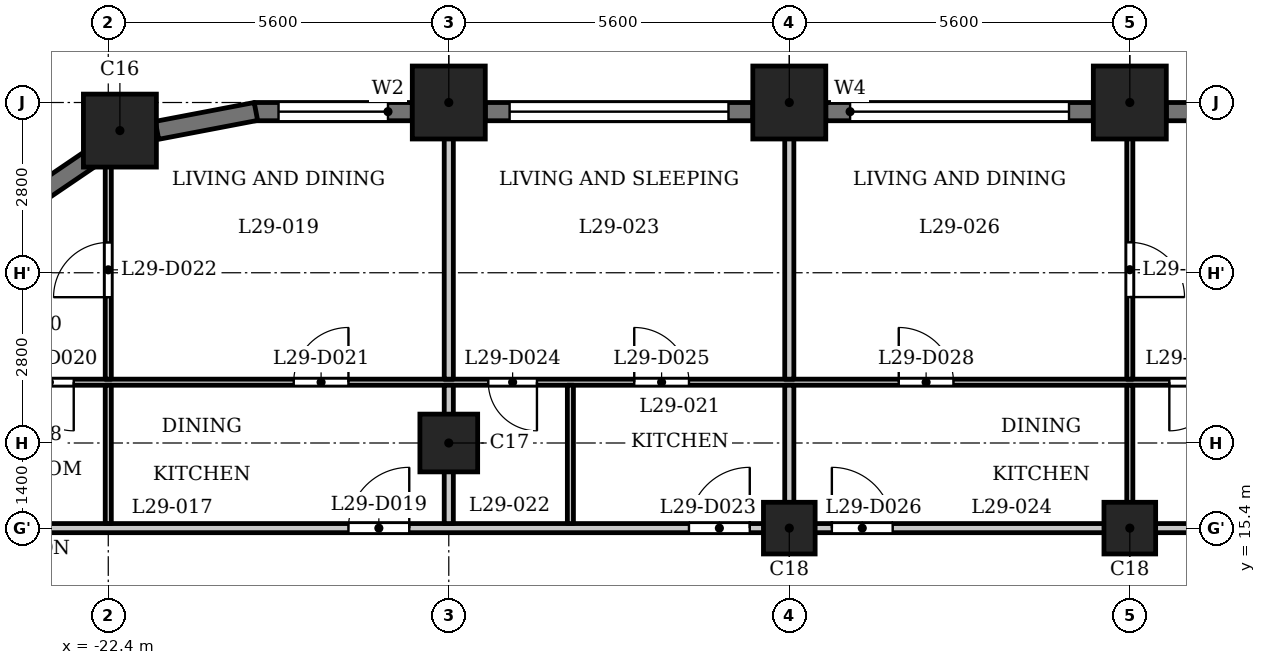
"""IFC4 building model, lengths in metres.
Left out: names, types, materials, properties, quantities, classifications, styles, units other than length and angle.
Written with IfcOpenShell. Run it as: python <this file> out.ifc"""

import sys

from ifc_helpers import new_model, si_unit, direction, frame, frame_2d, origin, origin_2d, place, context, subcontext, project, spatial, rectangle, extrude, element, fill, save


model = new_model("IFC4")
c1 = context("Model", 3, precision=1e-05, world=origin(), true_north=direction((0.0, 1.0)))
c2 = subcontext(c1, "Body", "Model", "MODEL_VIEW")
j1 = project(units=[si_unit("LENGTHUNIT", "METRE"), si_unit("PLANEANGLEUNIT", "RADIAN")], contexts=[c1])
p1 = place(None, origin())
s1 = spatial("IfcSite", under=j1, at=p1, CompositionType="ELEMENT")
p2 = place(p1, origin())
s2 = spatial("IfcBuilding", under=s1, at=p2, CompositionType="ELEMENT")
p3 = place(p2, frame((0.0, 0.0, 114.8)))
s3 = spatial("IfcBuildingStorey", under=s2, at=p3, CompositionType="ELEMENT", Elevation=114.8)
for number, where, z_axis, x_axis in (
    (1, (-5.6, 22.4, 0.0), (0.0, 0.0, 1.0), (1.0, 0.0, 0.0)),
    (2, (-11.2, 22.4, 0.0), (0.0, 0.0, 1.0), (1.0, 0.0, 0.0)),
    (3, (-16.8, 22.4, 0.0), (0.0, 0.0, 1.0), (1.0, 0.0, 0.0)),
    (4, (-22.209, 21.938, 0.0), (0.0, 0.0, 1.0), (1.0, 0.0, 0.0)),
):
    element("IfcColumn", number, at=place(p3, frame(where, z_axis=z_axis, x_axis=x_axis)), inside=s3, PredefinedType="COLUMN", context=c2, shape_type="SweptSolid", body=[
        extrude(rectangle(XDim=1.2, YDim=1.2, at=origin_2d()), origin(), (0.0, 0.0, 1.0), 3.5),
    ])
p4 = place(p3, frame((-16.8, 16.8, 0.0), z_axis=(0.0, 0.0, 1.0), x_axis=(1.0, 0.0, 0.0)))
e5 = element("IfcColumn", 5, at=p4, inside=s3, PredefinedType="COLUMN", context=c2, shape_type="SweptSolid", body=[
    extrude(rectangle(XDim=0.95, YDim=0.95, at=origin_2d()), origin(), (0.0, 0.0, 1.0), 3.5),
])
for number, where, z_axis, x_axis in (
    (6, (-11.2, 15.4, 0.0), (0.0, 0.0, 1.0), (1.0, 0.0, 0.0)),
    (7, (-5.6, 15.4, 0.0), (0.0, 0.0, 1.0), (1.0, 0.0, 0.0)),
):
    element("IfcColumn", number, at=place(p3, frame(where, z_axis=z_axis, x_axis=x_axis)), inside=s3, PredefinedType="COLUMN", context=c2, shape_type="SweptSolid", body=[
        extrude(rectangle(XDim=0.85, YDim=0.85, at=origin_2d()), origin(), (0.0, 0.0, 1.0), 3.5),
    ])
p5 = place(p3, frame((-0.6, 22.25, 0.0), z_axis=(0.0, 0.0, 1.0), x_axis=(-1.0, 0.0, 0.0)))
e8 = element("IfcWall", 8, at=p5, inside=s3, PredefinedType="SOLIDWALL", context=c2, shape_type="SweptSolid", body=[
    extrude(rectangle(XDim=4.4, YDim=0.3, at=frame_2d((2.2, 0.0))), origin(), (0.0, 0.0, 1.0), 2.4),
])
p6 = place(p5, frame((0.4, 0.0, 1.2)))
e9 = element("IfcOpeningElement", 9, at=p6, cuts=e8, PredefinedType="OPENING", context=c2, shape_type="SweptSolid", body=[
    extrude(rectangle(XDim=3.6, YDim=0.95, at=frame_2d((1.8, 0.475))), frame((0.0, 0.16, 0.0), z_axis=(0.0, -1.0, 0.0), x_axis=(1.0, 0.0, 0.0)), (0.0, 0.0, 1.0), 0.32),
])
p7 = place(p3, frame((-6.2, 22.25, 0.0), z_axis=(0.0, 0.0, 1.0), x_axis=(-1.0, 0.0, 0.0)))
e10 = element("IfcWall", 10, at=p7, inside=s3, PredefinedType="SOLIDWALL", context=c2, shape_type="SweptSolid", body=[
    extrude(rectangle(XDim=4.4, YDim=0.3, at=frame_2d((2.2, 0.0))), origin(), (0.0, 0.0, 1.0), 2.4),
])
p8 = place(p7, frame((0.4, 0.0, 1.2)))
e11 = element("IfcOpeningElement", 11, at=p8, cuts=e10, PredefinedType="OPENING", context=c2, shape_type="SweptSolid", body=[
    extrude(rectangle(XDim=3.6, YDim=0.95, at=frame_2d((1.8, 0.475))), frame((0.0, 0.16, 0.0), z_axis=(0.0, -1.0, 0.0), x_axis=(1.0, 0.0, 0.0)), (0.0, 0.0, 1.0), 0.32),
])
p9 = place(p3, frame((-11.8, 22.25, 0.0), z_axis=(0.0, 0.0, 1.0), x_axis=(-1.0, 0.0, 0.0)))
e12 = element("IfcWall", 12, at=p9, inside=s3, PredefinedType="SOLIDWALL", context=c2, shape_type="SweptSolid", body=[
    extrude(rectangle(XDim=4.4, YDim=0.3, at=frame_2d((2.2, 0.0))), origin(), (0.0, 0.0, 1.0), 2.4),
])
p10 = place(p9, frame((0.4, 0.0, 1.2)))
e13 = element("IfcOpeningElement", 13, at=p10, cuts=e12, PredefinedType="OPENING", context=c2, shape_type="SweptSolid", body=[
    extrude(rectangle(XDim=3.6, YDim=0.95, at=frame_2d((1.8, 0.475))), frame((0.0, 0.16, 0.0), z_axis=(0.0, -1.0, 0.0), x_axis=(1.0, 0.0, 0.0)), (0.0, 0.0, 1.0), 0.32),
])
p11 = place(p3, frame((-17.4, 22.25, 0.0), z_axis=(0.0, 0.0, 1.0), x_axis=(-1.0, 0.0, 0.0)))
e14 = element("IfcWall", 14, at=p11, inside=s3, PredefinedType="SOLIDWALL", context=c2, shape_type="SweptSolid", body=[
    extrude(rectangle(XDim=2.6, YDim=0.3, at=frame_2d((1.3, 0.0))), origin(), (0.0, 0.0, 1.0), 2.4),
])
p12 = place(p11, frame((0.4, 0.0, 0.9)))
e15 = element("IfcOpeningElement", 15, at=p12, cuts=e14, PredefinedType="OPENING", context=c2, shape_type="SweptSolid", body=[
    extrude(rectangle(XDim=1.8, YDim=1.25, at=frame_2d((0.9, 0.625))), frame((0.0, 0.16, 0.0), z_axis=(0.0, -1.0, 0.0), x_axis=(1.0, 0.0, 0.0)), (0.0, 0.0, 1.0), 0.32),
])
for number, where, z_axis, x_axis in (
    (16, (-19.972, 22.253, 0.0), (0.0, 0.0, 1.0), (-0.982, -0.187, 0.0)),
    (17, (-22.643, 21.51, 0.0), (0.0, 0.0, 1.0), (-0.827, -0.562, 0.0)),
):
    element("IfcWall", number, at=place(p3, frame(where, z_axis=z_axis, x_axis=x_axis)), inside=s3, PredefinedType="SOLIDWALL", context=c2, shape_type="SweptSolid", body=[
        extrude(rectangle(XDim=1.656, YDim=0.3, at=frame_2d((0.828, 0.0))), origin(), (0.0, 0.0, 1.0), 2.4),
    ])
p13 = place(p3, frame((-27.484, 15.4, 0.0), z_axis=(0.0, 0.0, 1.0), x_axis=(1.0, 0.0, 0.0)))
e18 = element("IfcWall", 18, at=p13, inside=s3, PredefinedType="PARTITIONING", context=c2, shape_type="SweptSolid", body=[
    extrude(rectangle(XDim=54.968, YDim=0.15, at=frame_2d((27.484, 0.0))), origin(), (0.0, 0.0, 1.0), 3.2),
])
p14 = place(p13, frame((9.034, 0.0, 0.0)))
e19 = element("IfcOpeningElement", 19, at=p14, cuts=e18, PredefinedType="OPENING", context=c2, shape_type="SweptSolid", body=[
    extrude(rectangle(XDim=1.0, YDim=2.1, at=frame_2d((0.5, 1.05))), frame((0.0, 0.085, 0.0), z_axis=(0.0, -1.0, 0.0), x_axis=(1.0, 0.0, 0.0)), (0.0, 0.0, 1.0), 0.17),
])
p15 = place(p13, frame((14.634, 0.0, 0.0)))
e20 = element("IfcOpeningElement", 20, at=p15, cuts=e18, PredefinedType="OPENING", context=c2, shape_type="SweptSolid", body=[
    extrude(rectangle(XDim=1.0, YDim=2.1, at=frame_2d((0.5, 1.05))), frame((0.0, 0.085, 0.0), z_axis=(0.0, -1.0, 0.0), x_axis=(1.0, 0.0, 0.0)), (0.0, 0.0, 1.0), 0.17),
])
p16 = place(p13, frame((16.984, 0.0, 0.0)))
e21 = element("IfcOpeningElement", 21, at=p16, cuts=e18, PredefinedType="OPENING", context=c2, shape_type="SweptSolid", body=[
    extrude(rectangle(XDim=1.0, YDim=2.1, at=frame_2d((0.5, 1.05))), frame((0.0, 0.085, 0.0), z_axis=(0.0, -1.0, 0.0), x_axis=(1.0, 0.0, 0.0)), (0.0, 0.0, 1.0), 0.17),
])
p17 = place(p13, frame((28.084, 0.0, 0.0)))
e22 = element("IfcOpeningElement", 22, at=p17, cuts=e18, PredefinedType="OPENING", context=c2, shape_type="SweptSolid", body=[
    extrude(rectangle(XDim=1.0, YDim=2.1, at=frame_2d((0.5, 1.05))), frame((0.0, 0.085, 0.0), z_axis=(0.0, -1.0, 0.0), x_axis=(1.0, 0.0, 0.0)), (0.0, 0.0, 1.0), 0.17),
])
p18 = place(p13, frame((34.834, 0.0, 0.0)))
e23 = element("IfcOpeningElement", 23, at=p18, cuts=e18, PredefinedType="OPENING", context=c2, shape_type="SweptSolid", body=[
    extrude(rectangle(XDim=1.0, YDim=2.1, at=frame_2d((0.5, 1.05))), frame((0.0, 0.085, 0.0), z_axis=(0.0, -1.0, 0.0), x_axis=(1.0, 0.0, 0.0)), (0.0, 0.0, 1.0), 0.17),
])
p19 = place(p13, frame((41.884, 0.0, 0.0)))
e24 = element("IfcOpeningElement", 24, at=p19, cuts=e18, PredefinedType="OPENING", context=c2, shape_type="SweptSolid", body=[
    extrude(rectangle(XDim=1.0, YDim=2.1, at=frame_2d((0.5, 1.05))), frame((0.0, 0.085, 0.0), z_axis=(0.0, -1.0, 0.0), x_axis=(1.0, 0.0, 0.0)), (0.0, 0.0, 1.0), 0.17),
])
p20 = place(p13, frame((48.234, 0.0, 0.0)))
e25 = element("IfcOpeningElement", 25, at=p20, cuts=e18, PredefinedType="OPENING", context=c2, shape_type="SweptSolid", body=[
    extrude(rectangle(XDim=1.0, YDim=2.1, at=frame_2d((0.5, 1.05))), frame((0.0, 0.085, 0.0), z_axis=(0.0, -1.0, 0.0), x_axis=(1.0, 0.0, 0.0)), (0.0, 0.0, 1.0), 0.17),
])
p21 = place(p3, frame((-26.465, 17.8, 0.0), z_axis=(0.0, 0.0, 1.0), x_axis=(1.0, 0.0, 0.0)))
e26 = element("IfcWall", 26, at=p21, inside=s3, PredefinedType="PARTITIONING", context=c2, shape_type="SweptSolid", body=[
    extrude(rectangle(XDim=52.859, YDim=0.1, at=frame_2d((26.43, 0.0))), origin(), (0.0, 0.0, 1.0), 3.2),
])
p22 = place(p21, frame((2.697, 0.0, 0.0)))
e27 = element("IfcOpeningElement", 27, at=p22, cuts=e26, PredefinedType="OPENING", context=c2, shape_type="SweptSolid", body=[
    extrude(rectangle(XDim=0.8, YDim=2.1, at=frame_2d((0.4, 1.05))), frame((0.0, 0.06, 0.0), z_axis=(0.0, -1.0, 0.0), x_axis=(1.0, 0.0, 0.0)), (0.0, 0.0, 1.0), 0.12),
])
p23 = place(p21, frame((7.115, 0.0, 0.0)))
e28 = element("IfcOpeningElement", 28, at=p23, cuts=e26, PredefinedType="OPENING", context=c2, shape_type="SweptSolid", body=[
    extrude(rectangle(XDim=0.9, YDim=2.1, at=frame_2d((0.45, 1.05))), frame((0.0, 0.06, 0.0), z_axis=(0.0, -1.0, 0.0), x_axis=(1.0, 0.0, 0.0)), (0.0, 0.0, 1.0), 0.12),
])
p24 = place(p21, frame((10.315, 0.0, 0.0)))
e29 = element("IfcOpeningElement", 29, at=p24, cuts=e26, PredefinedType="OPENING", context=c2, shape_type="SweptSolid", body=[
    extrude(rectangle(XDim=0.8, YDim=2.1, at=frame_2d((0.4, 1.05))), frame((0.0, 0.06, 0.0), z_axis=(0.0, -1.0, 0.0), x_axis=(1.0, 0.0, 0.0)), (0.0, 0.0, 1.0), 0.12),
])
p25 = place(p21, frame((12.715, 0.0, 0.0)))
e30 = element("IfcOpeningElement", 30, at=p25, cuts=e26, PredefinedType="OPENING", context=c2, shape_type="SweptSolid", body=[
    extrude(rectangle(XDim=0.9, YDim=2.1, at=frame_2d((0.45, 1.05))), frame((0.0, 0.06, 0.0), z_axis=(0.0, -1.0, 0.0), x_axis=(1.0, 0.0, 0.0)), (0.0, 0.0, 1.0), 0.12),
])
p26 = place(p21, frame((21.515, 0.0, 0.0)))
e31 = element("IfcOpeningElement", 31, at=p26, cuts=e26, PredefinedType="OPENING", context=c2, shape_type="SweptSolid", body=[
    extrude(rectangle(XDim=0.8, YDim=2.1, at=frame_2d((0.4, 1.05))), frame((0.0, 0.06, 0.0), z_axis=(0.0, -1.0, 0.0), x_axis=(1.0, 0.0, 0.0)), (0.0, 0.0, 1.0), 0.12),
])
p27 = place(p21, frame((17.065, 0.0, 0.0)))
e32 = element("IfcOpeningElement", 32, at=p27, cuts=e26, PredefinedType="OPENING", context=c2, shape_type="SweptSolid", body=[
    extrude(rectangle(XDim=0.9, YDim=2.1, at=frame_2d((0.45, 1.05))), frame((0.0, 0.06, 0.0), z_axis=(0.0, -1.0, 0.0), x_axis=(1.0, 0.0, 0.0)), (0.0, 0.0, 1.0), 0.12),
])
p28 = place(p21, frame((30.365, 0.0, 0.0)))
e33 = element("IfcOpeningElement", 33, at=p28, cuts=e26, PredefinedType="OPENING", context=c2, shape_type="SweptSolid", body=[
    extrude(rectangle(XDim=0.8, YDim=2.1, at=frame_2d((0.4, 1.05))), frame((0.0, 0.06, 0.0), z_axis=(0.0, -1.0, 0.0), x_axis=(1.0, 0.0, 0.0)), (0.0, 0.0, 1.0), 0.12),
])
p29 = place(p21, frame((28.165, 0.0, 0.0)))
e34 = element("IfcOpeningElement", 34, at=p29, cuts=e26, PredefinedType="OPENING", context=c2, shape_type="SweptSolid", body=[
    extrude(rectangle(XDim=0.9, YDim=2.1, at=frame_2d((0.45, 1.05))), frame((0.0, 0.06, 0.0), z_axis=(0.0, -1.0, 0.0), x_axis=(1.0, 0.0, 0.0)), (0.0, 0.0, 1.0), 0.12),
])
p30 = place(p21, frame((36.115, 0.0, 0.0)))
e35 = element("IfcOpeningElement", 35, at=p30, cuts=e26, PredefinedType="OPENING", context=c2, shape_type="SweptSolid", body=[
    extrude(rectangle(XDim=0.8, YDim=2.1, at=frame_2d((0.4, 1.05))), frame((0.0, 0.06, 0.0), z_axis=(0.0, -1.0, 0.0), x_axis=(1.0, 0.0, 0.0)), (0.0, 0.0, 1.0), 0.12),
])
p31 = place(p21, frame((32.915, 0.0, 0.0)))
e36 = element("IfcOpeningElement", 36, at=p31, cuts=e26, PredefinedType="OPENING", context=c2, shape_type="SweptSolid", body=[
    extrude(rectangle(XDim=0.9, YDim=2.1, at=frame_2d((0.45, 1.05))), frame((0.0, 0.06, 0.0), z_axis=(0.0, -1.0, 0.0), x_axis=(1.0, 0.0, 0.0)), (0.0, 0.0, 1.0), 0.12),
])
p32 = place(p21, frame((38.315, 0.0, 0.0)))
e37 = element("IfcOpeningElement", 37, at=p32, cuts=e26, PredefinedType="OPENING", context=c2, shape_type="SweptSolid", body=[
    extrude(rectangle(XDim=0.8, YDim=2.1, at=frame_2d((0.4, 1.05))), frame((0.0, 0.06, 0.0), z_axis=(0.0, -1.0, 0.0), x_axis=(1.0, 0.0, 0.0)), (0.0, 0.0, 1.0), 0.12),
])
p33 = place(p21, frame((40.965, 0.0, 0.0)))
e38 = element("IfcOpeningElement", 38, at=p33, cuts=e26, PredefinedType="OPENING", context=c2, shape_type="SweptSolid", body=[
    extrude(rectangle(XDim=0.9, YDim=2.1, at=frame_2d((0.45, 1.05))), frame((0.0, 0.06, 0.0), z_axis=(0.0, -1.0, 0.0), x_axis=(1.0, 0.0, 0.0)), (0.0, 0.0, 1.0), 0.12),
])
p34 = place(p21, frame((51.265, 0.0, 0.0)))
e39 = element("IfcOpeningElement", 39, at=p34, cuts=e26, PredefinedType="OPENING", context=c2, shape_type="SweptSolid", body=[
    extrude(rectangle(XDim=0.8, YDim=2.1, at=frame_2d((0.4, 1.05))), frame((0.0, 0.06, 0.0), z_axis=(0.0, -1.0, 0.0), x_axis=(1.0, 0.0, 0.0)), (0.0, 0.0, 1.0), 0.12),
])
p35 = place(p21, frame((46.315, 0.0, 0.0)))
e40 = element("IfcOpeningElement", 40, at=p35, cuts=e26, PredefinedType="OPENING", context=c2, shape_type="SweptSolid", body=[
    extrude(rectangle(XDim=0.9, YDim=2.1, at=frame_2d((0.45, 1.05))), frame((0.0, 0.06, 0.0), z_axis=(0.0, -1.0, 0.0), x_axis=(1.0, 0.0, 0.0)), (0.0, 0.0, 1.0), 0.12),
])
p36 = place(p3, frame((-22.4, 15.475, 0.0), z_axis=(0.0, 0.0, 1.0), x_axis=(0.0, 1.0, 0.0)))
e41 = element("IfcWall", 41, at=p36, inside=s3, PredefinedType="PARTITIONING", context=c2, shape_type="SweptSolid", body=[
    extrude(rectangle(XDim=2.275, YDim=0.1, at=frame_2d((1.137, 0.0))), origin(), (0.0, 0.0, 1.0), 3.2),
])
p37 = place(p3, frame((-22.4, 17.85, 0.0), z_axis=(0.0, 0.0, 1.0), x_axis=(0.0, 1.0, 0.0)))
e42 = element("IfcWall", 42, at=p37, inside=s3, PredefinedType="PARTITIONING", context=c2, shape_type="SweptSolid", body=[
    extrude(rectangle(XDim=3.87, YDim=0.1, at=frame_2d((1.935, 0.0))), origin(), (0.0, 0.0, 1.0), 3.2),
])
p38 = place(p37, frame((1.348, 0.0, 0.0)))
e43 = element("IfcOpeningElement", 43, at=p38, cuts=e42, PredefinedType="OPENING", context=c2, shape_type="SweptSolid", body=[
    extrude(rectangle(XDim=0.9, YDim=2.1, at=frame_2d((0.45, 1.05))), frame((0.0, 0.06, 0.0), z_axis=(0.0, -1.0, 0.0), x_axis=(1.0, 0.0, 0.0)), (0.0, 0.0, 1.0), 0.12),
])
p39 = place(p3, frame((-16.8, 15.475, 0.0), z_axis=(0.0, 0.0, 1.0), x_axis=(0.0, 1.0, 0.0)))
e44 = element("IfcWall", 44, at=p39, inside=s3, PredefinedType="PARTITIONING", context=c2, shape_type="SweptSolid", body=[
    extrude(rectangle(XDim=2.275, YDim=0.15, at=frame_2d((1.137, 0.0))), origin(), (0.0, 0.0, 1.0), 3.2),
])
p40 = place(p3, frame((-16.8, 17.85, 0.0), z_axis=(0.0, 0.0, 1.0), x_axis=(0.0, 1.0, 0.0)))
e45 = element("IfcWall", 45, at=p40, inside=s3, PredefinedType="PARTITIONING", context=c2, shape_type="SweptSolid", body=[
    extrude(rectangle(XDim=5.13, YDim=0.15, at=frame_2d((2.565, 0.0))), origin(), (0.0, 0.0, 1.0), 3.2),
])
p41 = place(p3, frame((-14.8, 15.475, 0.0), z_axis=(0.0, 0.0, 1.0), x_axis=(0.0, 1.0, 0.0)))
e46 = element("IfcWall", 46, at=p41, inside=s3, PredefinedType="PARTITIONING", context=c2, shape_type="SweptSolid", body=[
    extrude(rectangle(XDim=2.275, YDim=0.1, at=frame_2d((1.137, 0.0))), origin(), (0.0, 0.0, 1.0), 3.2),
])
p42 = place(p3, frame((-11.2, 15.475, 0.0), z_axis=(0.0, 0.0, 1.0), x_axis=(0.0, 1.0, 0.0)))
e47 = element("IfcWall", 47, at=p42, inside=s3, PredefinedType="PARTITIONING", context=c2, shape_type="SweptSolid", body=[
    extrude(rectangle(XDim=2.275, YDim=0.15, at=frame_2d((1.137, 0.0))), origin(), (0.0, 0.0, 1.0), 3.2),
])
p43 = place(p3, frame((-11.2, 17.85, 0.0), z_axis=(0.0, 0.0, 1.0), x_axis=(0.0, 1.0, 0.0)))
e48 = element("IfcWall", 48, at=p43, inside=s3, PredefinedType="PARTITIONING", context=c2, shape_type="SweptSolid", body=[
    extrude(rectangle(XDim=5.13, YDim=0.15, at=frame_2d((2.565, 0.0))), origin(), (0.0, 0.0, 1.0), 3.2),
])
p44 = place(p3, frame((-5.6, 15.475, 0.0), z_axis=(0.0, 0.0, 1.0), x_axis=(0.0, 1.0, 0.0)))
e49 = element("IfcWall", 49, at=p44, inside=s3, PredefinedType="PARTITIONING", context=c2, shape_type="SweptSolid", body=[
    extrude(rectangle(XDim=2.275, YDim=0.1, at=frame_2d((1.137, 0.0))), origin(), (0.0, 0.0, 1.0), 3.2),
])
p45 = place(p3, frame((-5.6, 17.85, 0.0), z_axis=(0.0, 0.0, 1.0), x_axis=(0.0, 1.0, 0.0)))
e50 = element("IfcWall", 50, at=p45, inside=s3, PredefinedType="PARTITIONING", context=c2, shape_type="SweptSolid", body=[
    extrude(rectangle(XDim=5.13, YDim=0.1, at=frame_2d((2.565, 0.0))), origin(), (0.0, 0.0, 1.0), 3.2),
])
p46 = place(p45, frame((1.35, 0.0, 0.0)))
e51 = element("IfcOpeningElement", 51, at=p46, cuts=e50, PredefinedType="OPENING", context=c2, shape_type="SweptSolid", body=[
    extrude(rectangle(XDim=0.9, YDim=2.1, at=frame_2d((0.45, 1.05))), frame((0.0, 0.06, 0.0), z_axis=(0.0, -1.0, 0.0), x_axis=(1.0, 0.0, 0.0)), (0.0, 0.0, 1.0), 0.12),
])
p47 = place(p14, origin())
e52 = element("IfcDoor", 52, at=p47, inside=s3, OperationType="SINGLE_SWING_LEFT", PredefinedType="DOOR", context=c2, shape_type="SweptSolid", body=[
    extrude(rectangle(XDim=1.0, YDim=2.1, at=frame_2d((0.5, 1.05))), frame((0.0, 0.025, 0.0), z_axis=(0.0, -1.0, 0.0), x_axis=(1.0, 0.0, 0.0)), (0.0, 0.0, 1.0), 0.05),
])
fill(e19, e52)
p48 = place(p22, origin())
e53 = element("IfcDoor", 53, at=p48, inside=s3, OperationType="SINGLE_SWING_RIGHT", PredefinedType="DOOR", context=c2, shape_type="SweptSolid", body=[
    extrude(rectangle(XDim=0.8, YDim=2.1, at=frame_2d((0.4, 1.05))), frame((0.0, 0.025, 0.0), z_axis=(0.0, -1.0, 0.0), x_axis=(1.0, 0.0, 0.0)), (0.0, 0.0, 1.0), 0.05),
])
fill(e27, e53)
p49 = place(p23, origin())
e54 = element("IfcDoor", 54, at=p49, inside=s3, OperationType="SINGLE_SWING_LEFT", PredefinedType="DOOR", context=c2, shape_type="SweptSolid", body=[
    extrude(rectangle(XDim=0.9, YDim=2.1, at=frame_2d((0.45, 1.05))), frame((0.0, 0.025, 0.0), z_axis=(0.0, -1.0, 0.0), x_axis=(1.0, 0.0, 0.0)), (0.0, 0.0, 1.0), 0.05),
])
fill(e28, e54)
p50 = place(p38, origin())
e55 = element("IfcDoor", 55, at=p50, inside=s3, OperationType="SINGLE_SWING_RIGHT", PredefinedType="DOOR", context=c2, shape_type="SweptSolid", body=[
    extrude(rectangle(XDim=0.9, YDim=2.1, at=frame_2d((0.45, 1.05))), frame((0.0, 0.025, 0.0), z_axis=(0.0, -1.0, 0.0), x_axis=(1.0, 0.0, 0.0)), (0.0, 0.0, 1.0), 0.05),
])
fill(e43, e55)
p51 = place(p15, origin())
e56 = element("IfcDoor", 56, at=p51, inside=s3, OperationType="SINGLE_SWING_LEFT", PredefinedType="DOOR", context=c2, shape_type="SweptSolid", body=[
    extrude(rectangle(XDim=1.0, YDim=2.1, at=frame_2d((0.5, 1.05))), frame((0.0, 0.025, 0.0), z_axis=(0.0, -1.0, 0.0), x_axis=(1.0, 0.0, 0.0)), (0.0, 0.0, 1.0), 0.05),
])
fill(e20, e56)
p52 = place(p24, origin())
e57 = element("IfcDoor", 57, at=p52, inside=s3, OperationType="SINGLE_SWING_RIGHT", PredefinedType="DOOR", context=c2, shape_type="SweptSolid", body=[
    extrude(rectangle(XDim=0.8, YDim=2.1, at=frame_2d((0.4, 1.05))), frame((0.0, 0.025, 0.0), z_axis=(0.0, -1.0, 0.0), x_axis=(1.0, 0.0, 0.0)), (0.0, 0.0, 1.0), 0.05),
])
fill(e29, e57)
p53 = place(p25, origin())
e58 = element("IfcDoor", 58, at=p53, inside=s3, OperationType="SINGLE_SWING_RIGHT", PredefinedType="DOOR", context=c2, shape_type="SweptSolid", body=[
    extrude(rectangle(XDim=0.9, YDim=2.1, at=frame_2d((0.45, 1.05))), frame((0.0, 0.025, 0.0), z_axis=(0.0, -1.0, 0.0), x_axis=(1.0, 0.0, 0.0)), (0.0, 0.0, 1.0), 0.05),
])
fill(e30, e58)
p54 = place(p16, origin())
e59 = element("IfcDoor", 59, at=p54, inside=s3, OperationType="SINGLE_SWING_RIGHT", PredefinedType="DOOR", context=c2, shape_type="SweptSolid", body=[
    extrude(rectangle(XDim=1.0, YDim=2.1, at=frame_2d((0.5, 1.05))), frame((0.0, 0.025, 0.0), z_axis=(0.0, -1.0, 0.0), x_axis=(1.0, 0.0, 0.0)), (0.0, 0.0, 1.0), 0.05),
])
fill(e21, e59)
p55 = place(p26, origin())
e60 = element("IfcDoor", 60, at=p55, inside=s3, OperationType="SINGLE_SWING_LEFT", PredefinedType="DOOR", context=c2, shape_type="SweptSolid", body=[
    extrude(rectangle(XDim=0.8, YDim=2.1, at=frame_2d((0.4, 1.05))), frame((0.0, 0.025, 0.0), z_axis=(0.0, -1.0, 0.0), x_axis=(1.0, 0.0, 0.0)), (0.0, 0.0, 1.0), 0.05),
])
fill(e31, e60)
p56 = place(p27, origin())
e61 = element("IfcDoor", 61, at=p56, inside=s3, OperationType="SINGLE_SWING_RIGHT", PredefinedType="DOOR", context=c2, shape_type="SweptSolid", body=[
    extrude(rectangle(XDim=0.9, YDim=2.1, at=frame_2d((0.45, 1.05))), frame((0.0, 0.025, 0.0), z_axis=(0.0, -1.0, 0.0), x_axis=(1.0, 0.0, 0.0)), (0.0, 0.0, 1.0), 0.05),
])
fill(e32, e61)
p57 = place(p46, origin())
e62 = element("IfcDoor", 62, at=p57, inside=s3, OperationType="SINGLE_SWING_LEFT", PredefinedType="DOOR", context=c2, shape_type="SweptSolid", body=[
    extrude(rectangle(XDim=0.9, YDim=2.1, at=frame_2d((0.45, 1.05))), frame((0.0, 0.025, 0.0), z_axis=(0.0, -1.0, 0.0), x_axis=(1.0, 0.0, 0.0)), (0.0, 0.0, 1.0), 0.05),
])
fill(e51, e62)
p58 = place(p8, origin())
e63 = element("IfcWindow", 63, at=p58, inside=s3, PartitioningType="SINGLE_PANEL", PredefinedType="WINDOW", context=c2, shape_type="SweptSolid", body=[
    extrude(rectangle(XDim=3.6, YDim=0.95, at=frame_2d((1.8, 0.475))), frame((0.0, 0.03, 0.0), z_axis=(0.0, -1.0, 0.0), x_axis=(1.0, 0.0, 0.0)), (0.0, 0.0, 1.0), 0.06),
])
fill(e11, e63)
p59 = place(p10, origin())
e64 = element("IfcWindow", 64, at=p59, inside=s3, PartitioningType="SINGLE_PANEL", PredefinedType="WINDOW", context=c2, shape_type="SweptSolid", body=[
    extrude(rectangle(XDim=3.6, YDim=0.95, at=frame_2d((1.8, 0.475))), frame((0.0, 0.03, 0.0), z_axis=(0.0, -1.0, 0.0), x_axis=(1.0, 0.0, 0.0)), (0.0, 0.0, 1.0), 0.06),
])
fill(e13, e64)
p60 = place(p12, origin())
e65 = element("IfcWindow", 65, at=p60, inside=s3, PartitioningType="SINGLE_PANEL", PredefinedType="WINDOW", context=c2, shape_type="SweptSolid", body=[
    extrude(rectangle(XDim=1.8, YDim=1.25, at=frame_2d((0.9, 0.625))), frame((0.0, 0.03, 0.0), z_axis=(0.0, -1.0, 0.0), x_axis=(1.0, 0.0, 0.0)), (0.0, 0.0, 1.0), 0.06),
])
fill(e15, e65)
save(model, sys.argv[1])
